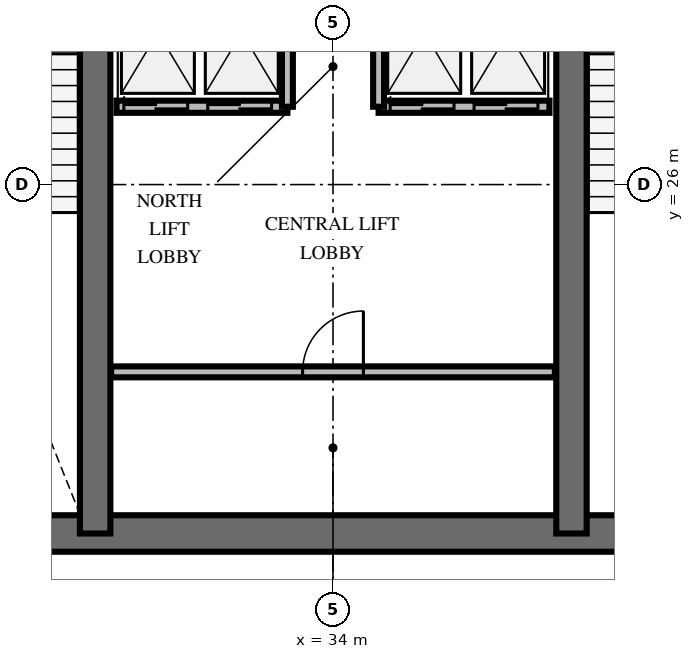
"""IFC4 building model, lengths in metres.
Left out: names, types, materials, properties, quantities, classifications, styles, units other than length and angle.
Written with IfcOpenShell. Run it as: python <this file> out.ifc"""

import sys

from ifc_helpers import new_model, si_unit, direction, frame, frame_2d, origin, place, context, subcontext, project, spatial, rectangle, extrude, element, fill, save


model = new_model("IFC4")
c1 = context("Model", 3, precision=1e-05, world=origin(), true_north=direction((0.0, 1.0)))
c2 = subcontext(c1, "Body", "Model", "MODEL_VIEW")
j1 = project(units=[si_unit("LENGTHUNIT", "METRE"), si_unit("PLANEANGLEUNIT", "RADIAN")], contexts=[c1])
p1 = place(None, origin())
s1 = spatial("IfcSite", under=j1, at=p1, CompositionType="ELEMENT")
p2 = place(p1, origin())
s2 = spatial("IfcBuilding", under=s1, at=p2, CompositionType="ELEMENT")
p3 = place(p2, frame((0.0, 0.0, 273.6)))
s3 = spatial("IfcBuildingStorey", under=s2, at=p3, CompositionType="ELEMENT", Elevation=273.6)
p4 = place(p3, frame((26.222, 20.262, 0.0), z_axis=(0.0, 0.0, 1.0), x_axis=(1.0, 0.0, 0.0)))
e1 = element("IfcWall", 1, at=p4, inside=s3, PredefinedType="SHEAR", context=c2, shape_type="SweptSolid", body=[
    extrude(rectangle(XDim=15.566, YDim=0.6, at=frame_2d((7.783, 0.0))), origin(), (0.0, 0.0, 1.0), 3.6),
])
for number, where, z_axis, x_axis in (
    (2, (30.088, 20.262, 0.0), (0.0, 0.0, 1.0), (0.0, 1.0, 0.0)),
    (3, (37.922, 20.262, 0.0), (0.0, 0.0, 1.0), (0.0, 1.0, 0.0)),
):
    element("IfcWall", number, at=place(p3, frame(where, z_axis=z_axis, x_axis=x_axis)), inside=s3, PredefinedType="SHEAR", context=c2, shape_type="SweptSolid", body=[
        extrude(rectangle(XDim=9.676, YDim=0.5, at=frame_2d((4.838, 0.0))), origin(), (0.0, 0.0, 1.0), 3.6),
    ])
p5 = place(p3, frame((30.35, 22.92, 0.0), z_axis=(0.0, 0.0, 1.0), x_axis=(1.0, 0.0, 0.0)))
e4 = element("IfcWall", 4, at=p5, inside=s3, PredefinedType="PARTITIONING", context=c2, shape_type="SweptSolid", body=[
    extrude(rectangle(XDim=7.3, YDim=0.18, at=frame_2d((3.65, 0.0))), origin(), (0.0, 0.0, 1.0), 2.46),
])
p6 = place(p5, frame((3.15, 0.0, 0.0)))
e5 = element("IfcOpeningElement", 5, at=p6, cuts=e4, PredefinedType="OPENING", context=c2, shape_type="SweptSolid", body=[
    extrude(rectangle(XDim=1.0, YDim=2.15, at=frame_2d((0.5, 1.075))), frame((0.0, 0.1, 0.0), z_axis=(0.0, -1.0, 0.0), x_axis=(1.0, 0.0, 0.0)), (0.0, 0.0, 1.0), 0.2),
])
p7 = place(p3, frame((30.44, 27.28, 0.0), z_axis=(0.0, 0.0, 1.0), x_axis=(1.0, 0.0, 0.0)))
e6 = element("IfcWall", 6, at=p7, inside=s3, PredefinedType="SOLIDWALL", context=c2, shape_type="SweptSolid", body=[
    extrude(rectangle(XDim=2.81, YDim=0.2, at=frame_2d((1.405, 0.0))), origin(), (0.0, 0.0, 1.0), 2.46),
])
p8 = place(p7, frame((0.12, 0.0, 0.0)))
e7 = element("IfcOpeningElement", 7, at=p8, cuts=e6, PredefinedType="OPENING", context=c2, shape_type="SweptSolid", body=[
    extrude(rectangle(XDim=1.05, YDim=2.1, at=frame_2d((0.525, 1.05))), frame((0.0, 0.11, 0.0), z_axis=(0.0, -1.0, 0.0), x_axis=(1.0, 0.0, 0.0)), (0.0, 0.0, 1.0), 0.22),
])
p9 = place(p7, frame((1.5, 0.0, 0.0)))
e8 = element("IfcOpeningElement", 8, at=p9, cuts=e6, PredefinedType="OPENING", context=c2, shape_type="SweptSolid", body=[
    extrude(rectangle(XDim=1.05, YDim=2.1, at=frame_2d((0.525, 1.05))), frame((0.0, 0.11, 0.0), z_axis=(0.0, -1.0, 0.0), x_axis=(1.0, 0.0, 0.0)), (0.0, 0.0, 1.0), 0.22),
])
p10 = place(p3, frame((33.25, 27.28, 0.0), z_axis=(0.0, 0.0, 1.0), x_axis=(0.0, 1.0, 0.0)))
e9 = element("IfcWall", 9, at=p10, inside=s3, PredefinedType="SOLIDWALL", context=c2, shape_type="SweptSolid", body=[
    extrude(rectangle(XDim=2.47, YDim=0.18, at=frame_2d((1.235, 0.0))), origin(), (0.0, 0.0, 1.0), 2.46),
])
p11 = place(p3, frame((34.75, 27.28, 0.0), z_axis=(0.0, 0.0, 1.0), x_axis=(1.0, 0.0, 0.0)))
e10 = element("IfcWall", 10, at=p11, inside=s3, PredefinedType="SOLIDWALL", context=c2, shape_type="SweptSolid", body=[
    extrude(rectangle(XDim=2.81, YDim=0.2, at=frame_2d((1.405, 0.0))), origin(), (0.0, 0.0, 1.0), 2.46),
])
p12 = place(p11, frame((0.19, 0.0, 0.0)))
e11 = element("IfcOpeningElement", 11, at=p12, cuts=e10, PredefinedType="OPENING", context=c2, shape_type="SweptSolid", body=[
    extrude(rectangle(XDim=1.05, YDim=2.1, at=frame_2d((0.525, 1.05))), frame((0.0, 0.11, 0.0), z_axis=(0.0, -1.0, 0.0), x_axis=(1.0, 0.0, 0.0)), (0.0, 0.0, 1.0), 0.22),
])
p13 = place(p11, frame((1.57, 0.0, 0.0)))
e12 = element("IfcOpeningElement", 12, at=p13, cuts=e10, PredefinedType="OPENING", context=c2, shape_type="SweptSolid", body=[
    extrude(rectangle(XDim=1.05, YDim=2.1, at=frame_2d((0.525, 1.05))), frame((0.0, 0.11, 0.0), z_axis=(0.0, -1.0, 0.0), x_axis=(1.0, 0.0, 0.0)), (0.0, 0.0, 1.0), 0.22),
])
p14 = place(p3, frame((34.75, 27.28, 0.0), z_axis=(0.0, 0.0, 1.0), x_axis=(0.0, 1.0, 0.0)))
e13 = element("IfcWall", 13, at=p14, inside=s3, PredefinedType="SOLIDWALL", context=c2, shape_type="SweptSolid", body=[
    extrude(rectangle(XDim=2.47, YDim=0.18, at=frame_2d((1.235, 0.0))), origin(), (0.0, 0.0, 1.0), 2.46),
])
p15 = place(p6, origin())
e14 = element("IfcDoor", 14, at=p15, inside=s3, OperationType="SINGLE_SWING_RIGHT", PredefinedType="DOOR", context=c2, shape_type="SweptSolid", body=[
    extrude(rectangle(XDim=1.0, YDim=2.15, at=frame_2d((0.5, 1.075))), frame((0.0, 0.025, 0.0), z_axis=(0.0, -1.0, 0.0), x_axis=(1.0, 0.0, 0.0)), (0.0, 0.0, 1.0), 0.05),
])
fill(e5, e14)
p16 = place(p8, origin())
e15 = element("IfcDoor", 15, at=p16, inside=s3, OperationType="DOUBLE_DOOR_SLIDING", PredefinedType="USERDEFINED", context=c2, shape_type="SweptSolid", body=[
    extrude(rectangle(XDim=1.05, YDim=2.1, at=frame_2d((0.525, 1.05))), frame((0.0, 0.025, 0.0), z_axis=(0.0, -1.0, 0.0), x_axis=(1.0, 0.0, 0.0)), (0.0, 0.0, 1.0), 0.05),
])
fill(e7, e15)
p17 = place(p9, origin())
e16 = element("IfcDoor", 16, at=p17, inside=s3, OperationType="DOUBLE_DOOR_SLIDING", PredefinedType="USERDEFINED", context=c2, shape_type="SweptSolid", body=[
    extrude(rectangle(XDim=1.05, YDim=2.1, at=frame_2d((0.525, 1.05))), frame((0.0, 0.025, 0.0), z_axis=(0.0, -1.0, 0.0), x_axis=(1.0, 0.0, 0.0)), (0.0, 0.0, 1.0), 0.05),
])
fill(e8, e16)
p18 = place(p12, origin())
e17 = element("IfcDoor", 17, at=p18, inside=s3, OperationType="DOUBLE_DOOR_SLIDING", PredefinedType="USERDEFINED", context=c2, shape_type="SweptSolid", body=[
    extrude(rectangle(XDim=1.05, YDim=2.1, at=frame_2d((0.525, 1.05))), frame((0.0, 0.025, 0.0), z_axis=(0.0, -1.0, 0.0), x_axis=(1.0, 0.0, 0.0)), (0.0, 0.0, 1.0), 0.05),
])
fill(e11, e17)
p19 = place(p13, origin())
e18 = element("IfcDoor", 18, at=p19, inside=s3, OperationType="DOUBLE_DOOR_SLIDING", PredefinedType="USERDEFINED", context=c2, shape_type="SweptSolid", body=[
    extrude(rectangle(XDim=1.05, YDim=2.1, at=frame_2d((0.525, 1.05))), frame((0.0, 0.025, 0.0), z_axis=(0.0, -1.0, 0.0), x_axis=(1.0, 0.0, 0.0)), (0.0, 0.0, 1.0), 0.05),
])
fill(e12, e18)
save(model, sys.argv[1])
